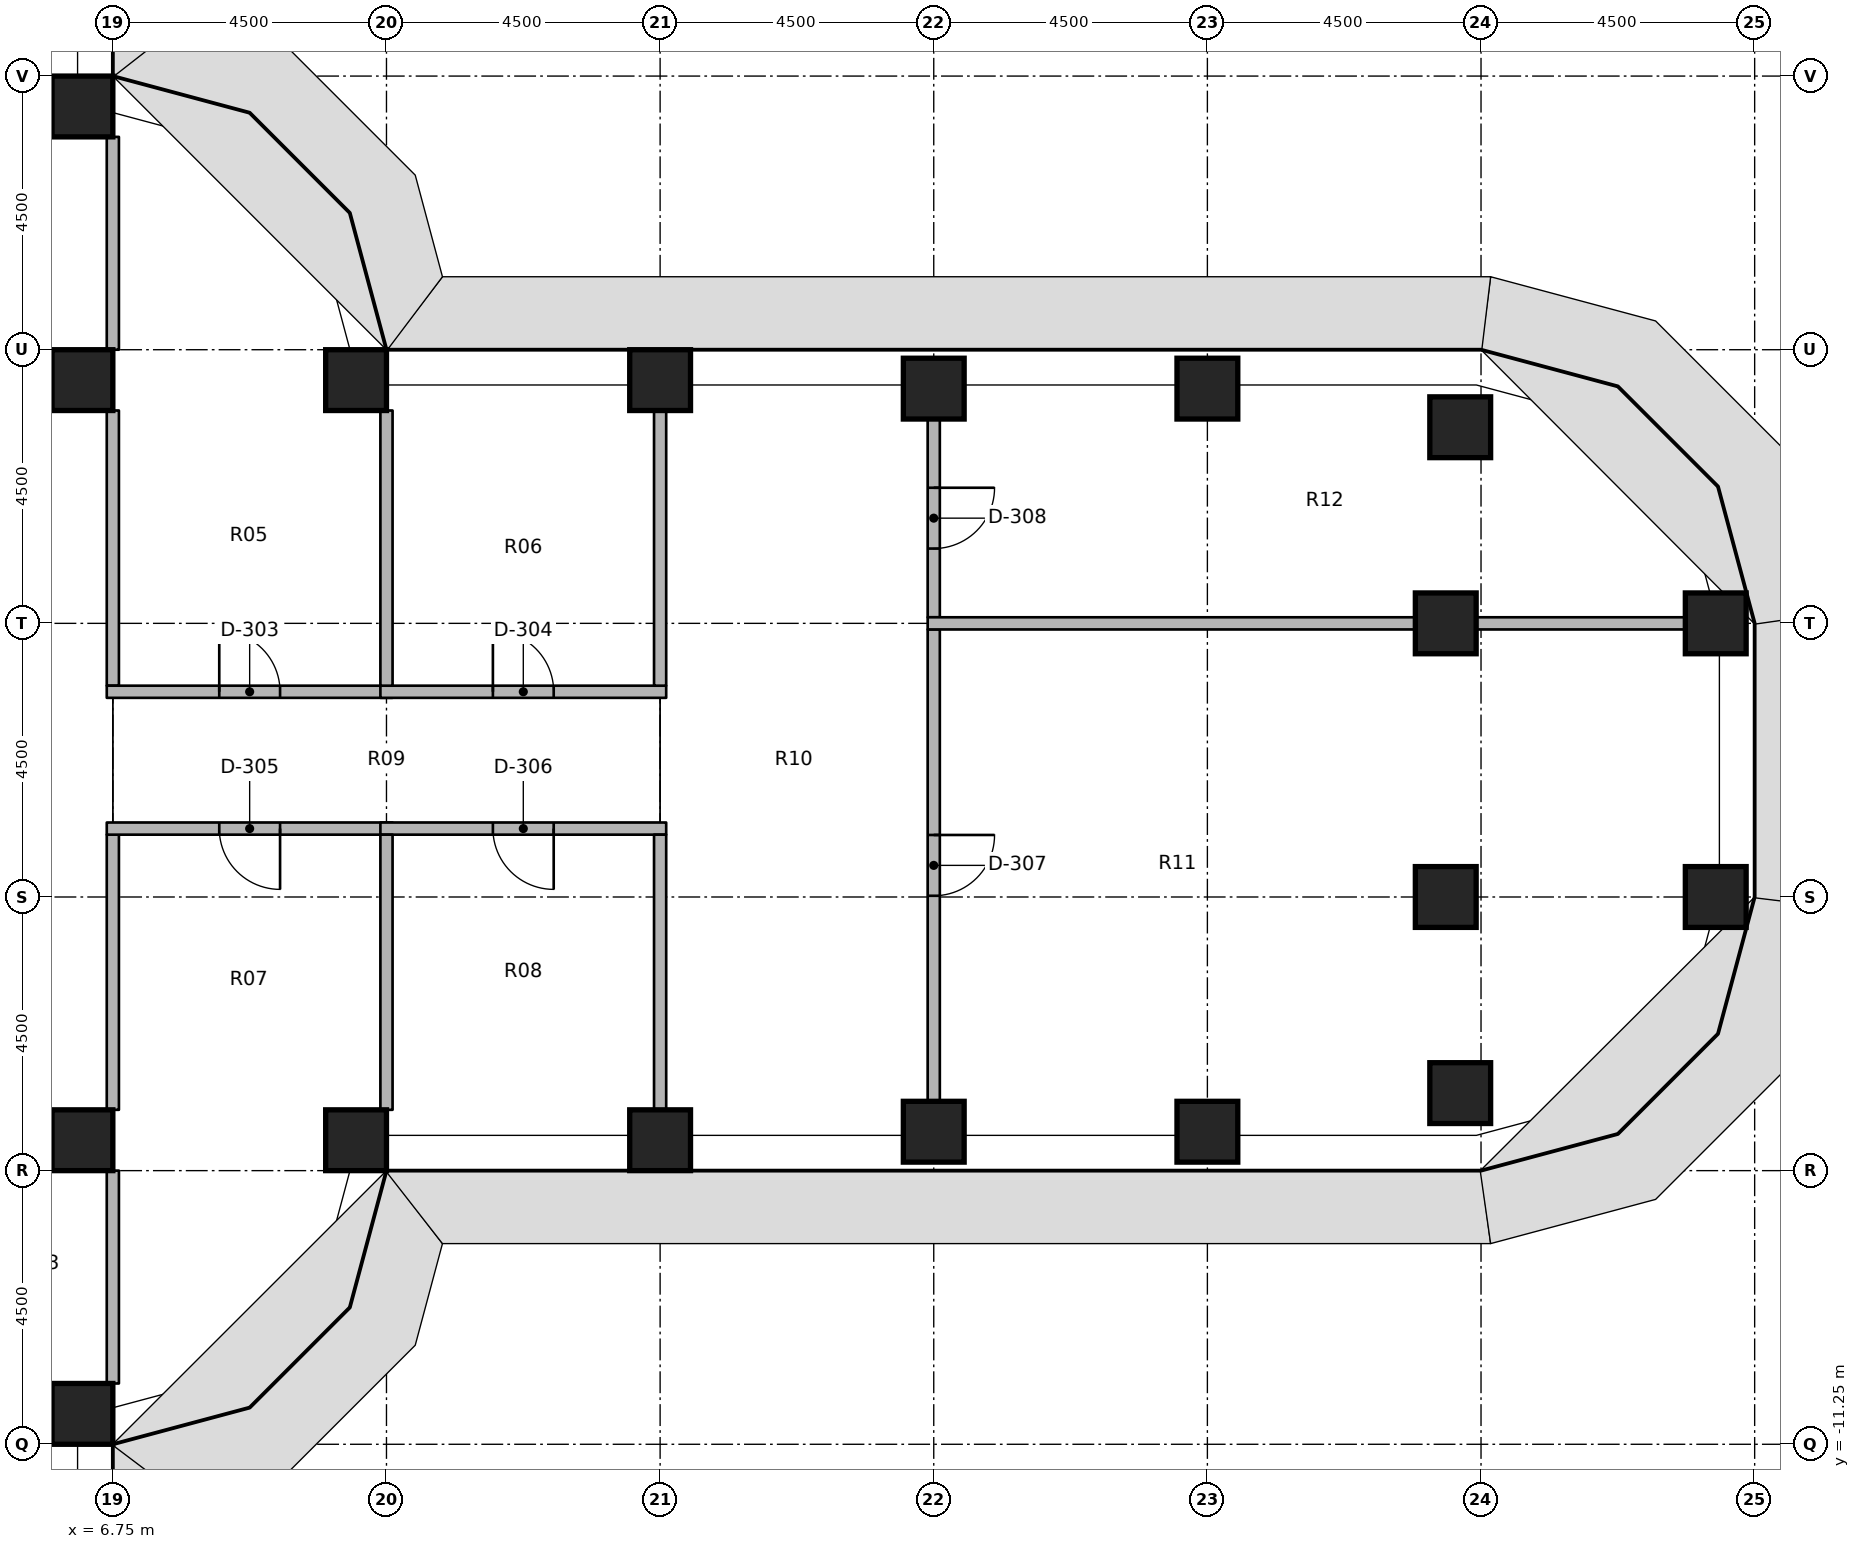
"""IFC4 building model, lengths in metres.
Left out: names, types, materials, properties, quantities, classifications, styles, units other than length and angle.
Written with IfcOpenShell. Run it as: python <this file> out.ifc"""

import sys

from ifc_helpers import new_model, si_unit, direction, frame, frame_2d, origin, origin_2d, place, context, subcontext, project, spatial, rectangle, extrude, element, fill, save


model = new_model("IFC4")
c1 = context("Model", 3, precision=1e-05, world=origin(), true_north=direction((0.0, 1.0)))
c2 = subcontext(c1, "Body", "Model", "MODEL_VIEW")
j1 = project(units=[si_unit("LENGTHUNIT", "METRE"), si_unit("PLANEANGLEUNIT", "RADIAN")], contexts=[c1])
p1 = place(None, origin())
s1 = spatial("IfcSite", under=j1, at=p1, CompositionType="ELEMENT")
p2 = place(p1, origin())
s2 = spatial("IfcBuilding", under=s1, at=p2, CompositionType="ELEMENT")
p3 = place(p2, frame((0.0, 0.0, 43.8)))
s3 = spatial("IfcBuildingStorey", under=s2, at=p3, CompositionType="ELEMENT", Elevation=43.8)
for number, where, z_axis, x_axis in (
    (1, (6.25, -10.75, 0.0), (0.0, 0.0, 1.0), (1.0, 0.0, 0.0)),
    (2, (6.25, -6.25, 0.0), (0.0, 0.0, 1.0), (1.0, 0.0, 0.0)),
    (3, (6.25, 6.25, 0.0), (0.0, 0.0, 1.0), (1.0, 0.0, 0.0)),
    (4, (6.25, 10.75, 0.0), (0.0, 0.0, 1.0), (1.0, 0.0, 0.0)),
    (5, (10.75, -6.25, 0.0), (0.0, 0.0, 1.0), (1.0, 0.0, 0.0)),
    (6, (10.75, 6.25, 0.0), (0.0, 0.0, 1.0), (1.0, 0.0, 0.0)),
    (7, (15.75, -6.25, 0.0), (0.0, 0.0, 1.0), (1.0, 0.0, 0.0)),
    (8, (15.75, 6.25, 0.0), (0.0, 0.0, 1.0), (1.0, 0.0, 0.0)),
    (9, (20.25, -6.11, 0.0), (0.0, 0.0, 1.0), (1.0, 0.0, 0.0)),
    (10, (20.25, 6.11, 0.0), (0.0, 0.0, 1.0), (1.0, 0.0, 0.0)),
    (11, (24.75, -6.11, 0.0), (0.0, 0.0, 1.0), (1.0, 0.0, 0.0)),
    (12, (24.75, 6.11, 0.0), (0.0, 0.0, 1.0), (1.0, 0.0, 0.0)),
    (13, (28.908, -5.475, 0.0), (0.0, 0.0, 1.0), (1.0, 0.0, 0.0)),
    (14, (28.67, -2.25, 0.0), (0.0, 0.0, 1.0), (1.0, 0.0, 0.0)),
    (15, (28.67, 2.25, 0.0), (0.0, 0.0, 1.0), (1.0, 0.0, 0.0)),
    (16, (28.908, 5.475, 0.0), (0.0, 0.0, 1.0), (1.0, 0.0, 0.0)),
    (17, (33.11, -2.25, 0.0), (0.0, 0.0, 1.0), (1.0, 0.0, 0.0)),
    (18, (33.11, 2.25, 0.0), (0.0, 0.0, 1.0), (1.0, 0.0, 0.0)),
):
    element("IfcColumn", number, at=place(p3, frame(where, z_axis=z_axis, x_axis=x_axis)), inside=s3, PredefinedType="COLUMN", context=c2, shape_type="SweptSolid", body=[
        extrude(rectangle(XDim=1.0, YDim=1.0, at=origin_2d()), origin(), (0.0, 0.0, 1.0), 4.05),
    ])
p4 = place(p3, frame((6.75, 1.225, 0.0), z_axis=(0.0, 0.0, 1.0), x_axis=(0.0, 1.0, 0.0)))
e19 = element("IfcWall", 19, at=p4, inside=s3, PredefinedType="PARTITIONING", context=c2, shape_type="SweptSolid", body=[
    extrude(rectangle(XDim=4.525, YDim=0.2, at=frame_2d((2.262, 0.0))), origin(), (0.0, 0.0, 1.0), 3.13),
])
for number, where, z_axis, x_axis in (
    (20, (6.75, 6.75, 0.0), (0.0, 0.0, 1.0), (0.0, 1.0, 0.0)),
    (21, (6.75, -10.25, 0.0), (0.0, 0.0, 1.0), (0.0, 1.0, 0.0)),
):
    element("IfcWall", number, at=place(p3, frame(where, z_axis=z_axis, x_axis=x_axis)), inside=s3, PredefinedType="PARTITIONING", context=c2, shape_type="SweptSolid", body=[
        extrude(rectangle(XDim=3.5, YDim=0.2, at=frame_2d((1.75, 0.0))), origin(), (0.0, 0.0, 1.0), 3.13),
    ])
p5 = place(p3, frame((6.75, -5.75, 0.0), z_axis=(0.0, 0.0, 1.0), x_axis=(0.0, 1.0, 0.0)))
e22 = element("IfcWall", 22, at=p5, inside=s3, PredefinedType="PARTITIONING", context=c2, shape_type="SweptSolid", body=[
    extrude(rectangle(XDim=4.525, YDim=0.2, at=frame_2d((2.262, 0.0))), origin(), (0.0, 0.0, 1.0), 3.13),
])
p6 = place(p3, frame((6.65, 1.125, 0.0), z_axis=(0.0, 0.0, 1.0), x_axis=(1.0, 0.0, 0.0)))
e23 = element("IfcWall", 23, at=p6, inside=s3, PredefinedType="PARTITIONING", context=c2, shape_type="SweptSolid", body=[
    extrude(rectangle(XDim=4.7, YDim=0.2, at=frame_2d((2.35, 0.0))), origin(), (0.0, 0.0, 1.0), 3.13),
])
p7 = place(p6, frame((1.85, 0.0, 0.0)))
e24 = element("IfcOpeningElement", 24, at=p7, cuts=e23, PredefinedType="OPENING", context=c2, shape_type="SweptSolid", body=[
    extrude(rectangle(XDim=1.0, YDim=2.1, at=frame_2d((0.5, 1.05))), frame((0.0, 0.11, 0.0), z_axis=(0.0, -1.0, 0.0), x_axis=(1.0, 0.0, 0.0)), (0.0, 0.0, 1.0), 0.22),
])
p8 = place(p3, frame((11.35, -1.125, 0.0), z_axis=(0.0, 0.0, 1.0), x_axis=(-1.0, 0.0, 0.0)))
e25 = element("IfcWall", 25, at=p8, inside=s3, PredefinedType="PARTITIONING", context=c2, shape_type="SweptSolid", body=[
    extrude(rectangle(XDim=4.7, YDim=0.2, at=frame_2d((2.35, 0.0))), origin(), (0.0, 0.0, 1.0), 3.13),
])
p9 = place(p8, frame((1.85, 0.0, 0.0)))
e26 = element("IfcOpeningElement", 26, at=p9, cuts=e25, PredefinedType="OPENING", context=c2, shape_type="SweptSolid", body=[
    extrude(rectangle(XDim=1.0, YDim=2.1, at=frame_2d((0.5, 1.05))), frame((0.0, 0.11, 0.0), z_axis=(0.0, -1.0, 0.0), x_axis=(1.0, 0.0, 0.0)), (0.0, 0.0, 1.0), 0.22),
])
p10 = place(p3, frame((11.15, 1.125, 0.0), z_axis=(0.0, 0.0, 1.0), x_axis=(1.0, 0.0, 0.0)))
e27 = element("IfcWall", 27, at=p10, inside=s3, PredefinedType="PARTITIONING", context=c2, shape_type="SweptSolid", body=[
    extrude(rectangle(XDim=4.7, YDim=0.2, at=frame_2d((2.35, 0.0))), origin(), (0.0, 0.0, 1.0), 3.13),
])
p11 = place(p10, frame((1.85, 0.0, 0.0)))
e28 = element("IfcOpeningElement", 28, at=p11, cuts=e27, PredefinedType="OPENING", context=c2, shape_type="SweptSolid", body=[
    extrude(rectangle(XDim=1.0, YDim=2.1, at=frame_2d((0.5, 1.05))), frame((0.0, 0.11, 0.0), z_axis=(0.0, -1.0, 0.0), x_axis=(1.0, 0.0, 0.0)), (0.0, 0.0, 1.0), 0.22),
])
p12 = place(p3, frame((15.85, -1.125, 0.0), z_axis=(0.0, 0.0, 1.0), x_axis=(-1.0, 0.0, 0.0)))
e29 = element("IfcWall", 29, at=p12, inside=s3, PredefinedType="PARTITIONING", context=c2, shape_type="SweptSolid", body=[
    extrude(rectangle(XDim=4.7, YDim=0.2, at=frame_2d((2.35, 0.0))), origin(), (0.0, 0.0, 1.0), 3.13),
])
p13 = place(p12, frame((1.85, 0.0, 0.0)))
e30 = element("IfcOpeningElement", 30, at=p13, cuts=e29, PredefinedType="OPENING", context=c2, shape_type="SweptSolid", body=[
    extrude(rectangle(XDim=1.0, YDim=2.1, at=frame_2d((0.5, 1.05))), frame((0.0, 0.11, 0.0), z_axis=(0.0, -1.0, 0.0), x_axis=(1.0, 0.0, 0.0)), (0.0, 0.0, 1.0), 0.22),
])
for number, where, z_axis, x_axis in (
    (31, (11.25, 1.225, 0.0), (0.0, 0.0, 1.0), (0.0, 1.0, 0.0)),
    (32, (11.25, -5.75, 0.0), (0.0, 0.0, 1.0), (0.0, 1.0, 0.0)),
    (33, (15.75, 1.225, 0.0), (0.0, 0.0, 1.0), (0.0, 1.0, 0.0)),
    (34, (15.75, -5.75, 0.0), (0.0, 0.0, 1.0), (0.0, 1.0, 0.0)),
):
    element("IfcWall", number, at=place(p3, frame(where, z_axis=z_axis, x_axis=x_axis)), inside=s3, PredefinedType="PARTITIONING", context=c2, shape_type="SweptSolid", body=[
        extrude(rectangle(XDim=4.525, YDim=0.2, at=frame_2d((2.262, 0.0))), origin(), (0.0, 0.0, 1.0), 3.13),
    ])
p14 = place(p3, frame((20.25, 2.15, 0.0), z_axis=(0.0, 0.0, 1.0), x_axis=(0.0, -1.0, 0.0)))
e35 = element("IfcWall", 35, at=p14, inside=s3, PredefinedType="PARTITIONING", context=c2, shape_type="SweptSolid", body=[
    extrude(rectangle(XDim=7.76, YDim=0.2, at=frame_2d((3.88, 0.0))), origin(), (0.0, 0.0, 1.0), 3.13),
])
p15 = place(p14, frame((3.38, 0.0, 0.0)))
e36 = element("IfcOpeningElement", 36, at=p15, cuts=e35, PredefinedType="OPENING", context=c2, shape_type="SweptSolid", body=[
    extrude(rectangle(XDim=1.0, YDim=2.1, at=frame_2d((0.5, 1.05))), frame((0.0, 0.11, 0.0), z_axis=(0.0, -1.0, 0.0), x_axis=(1.0, 0.0, 0.0)), (0.0, 0.0, 1.0), 0.22),
])
p16 = place(p3, frame((20.25, 5.61, 0.0), z_axis=(0.0, 0.0, 1.0), x_axis=(0.0, -1.0, 0.0)))
e37 = element("IfcWall", 37, at=p16, inside=s3, PredefinedType="PARTITIONING", context=c2, shape_type="SweptSolid", body=[
    extrude(rectangle(XDim=3.26, YDim=0.2, at=frame_2d((1.63, 0.0))), origin(), (0.0, 0.0, 1.0), 3.13),
])
p17 = place(p16, frame((1.13, 0.0, 0.0)))
e38 = element("IfcOpeningElement", 38, at=p17, cuts=e37, PredefinedType="OPENING", context=c2, shape_type="SweptSolid", body=[
    extrude(rectangle(XDim=1.0, YDim=2.1, at=frame_2d((0.5, 1.05))), frame((0.0, 0.11, 0.0), z_axis=(0.0, -1.0, 0.0), x_axis=(1.0, 0.0, 0.0)), (0.0, 0.0, 1.0), 0.22),
])
p18 = place(p3, frame((20.15, 2.25, 0.0), z_axis=(0.0, 0.0, 1.0), x_axis=(1.0, 0.0, 0.0)))
e39 = element("IfcWall", 39, at=p18, inside=s3, PredefinedType="PARTITIONING", context=c2, shape_type="SweptSolid", body=[
    extrude(rectangle(XDim=8.02, YDim=0.2, at=frame_2d((4.01, 0.0))), origin(), (0.0, 0.0, 1.0), 3.13),
])
p19 = place(p3, frame((29.17, 2.25, 0.0), z_axis=(0.0, 0.0, 1.0), x_axis=(1.0, 0.0, 0.0)))
e40 = element("IfcWall", 40, at=p19, inside=s3, PredefinedType="PARTITIONING", context=c2, shape_type="SweptSolid", body=[
    extrude(rectangle(XDim=3.44, YDim=0.2, at=frame_2d((1.72, 0.0))), origin(), (0.0, 0.0, 1.0), 3.13),
])
p20 = place(p7, origin())
e41 = element("IfcDoor", 41, at=p20, inside=s3, OperationType="SINGLE_SWING_RIGHT", PredefinedType="DOOR", context=c2, shape_type="SweptSolid", body=[
    extrude(rectangle(XDim=1.0, YDim=2.1, at=frame_2d((0.5, 1.05))), frame((0.0, 0.025, 0.0), z_axis=(0.0, -1.0, 0.0), x_axis=(1.0, 0.0, 0.0)), (0.0, 0.0, 1.0), 0.05),
])
fill(e24, e41)
p21 = place(p11, origin())
e42 = element("IfcDoor", 42, at=p21, inside=s3, OperationType="SINGLE_SWING_RIGHT", PredefinedType="DOOR", context=c2, shape_type="SweptSolid", body=[
    extrude(rectangle(XDim=1.0, YDim=2.1, at=frame_2d((0.5, 1.05))), frame((0.0, 0.025, 0.0), z_axis=(0.0, -1.0, 0.0), x_axis=(1.0, 0.0, 0.0)), (0.0, 0.0, 1.0), 0.05),
])
fill(e28, e42)
p22 = place(p9, origin())
e43 = element("IfcDoor", 43, at=p22, inside=s3, OperationType="SINGLE_SWING_RIGHT", PredefinedType="DOOR", context=c2, shape_type="SweptSolid", body=[
    extrude(rectangle(XDim=1.0, YDim=2.1, at=frame_2d((0.5, 1.05))), frame((0.0, 0.025, 0.0), z_axis=(0.0, -1.0, 0.0), x_axis=(1.0, 0.0, 0.0)), (0.0, 0.0, 1.0), 0.05),
])
fill(e26, e43)
p23 = place(p13, origin())
e44 = element("IfcDoor", 44, at=p23, inside=s3, OperationType="SINGLE_SWING_RIGHT", PredefinedType="DOOR", context=c2, shape_type="SweptSolid", body=[
    extrude(rectangle(XDim=1.0, YDim=2.1, at=frame_2d((0.5, 1.05))), frame((0.0, 0.025, 0.0), z_axis=(0.0, -1.0, 0.0), x_axis=(1.0, 0.0, 0.0)), (0.0, 0.0, 1.0), 0.05),
])
fill(e30, e44)
p24 = place(p15, origin())
e45 = element("IfcDoor", 45, at=p24, inside=s3, OperationType="SINGLE_SWING_RIGHT", PredefinedType="DOOR", context=c2, shape_type="SweptSolid", body=[
    extrude(rectangle(XDim=1.0, YDim=2.1, at=frame_2d((0.5, 1.05))), frame((0.0, 0.025, 0.0), z_axis=(0.0, -1.0, 0.0), x_axis=(1.0, 0.0, 0.0)), (0.0, 0.0, 1.0), 0.05),
])
fill(e36, e45)
p25 = place(p17, origin())
e46 = element("IfcDoor", 46, at=p25, inside=s3, OperationType="SINGLE_SWING_LEFT", PredefinedType="DOOR", context=c2, shape_type="SweptSolid", body=[
    extrude(rectangle(XDim=1.0, YDim=2.1, at=frame_2d((0.5, 1.05))), frame((0.0, 0.025, 0.0), z_axis=(0.0, -1.0, 0.0), x_axis=(1.0, 0.0, 0.0)), (0.0, 0.0, 1.0), 0.05),
])
fill(e38, e46)
save(model, sys.argv[1])
